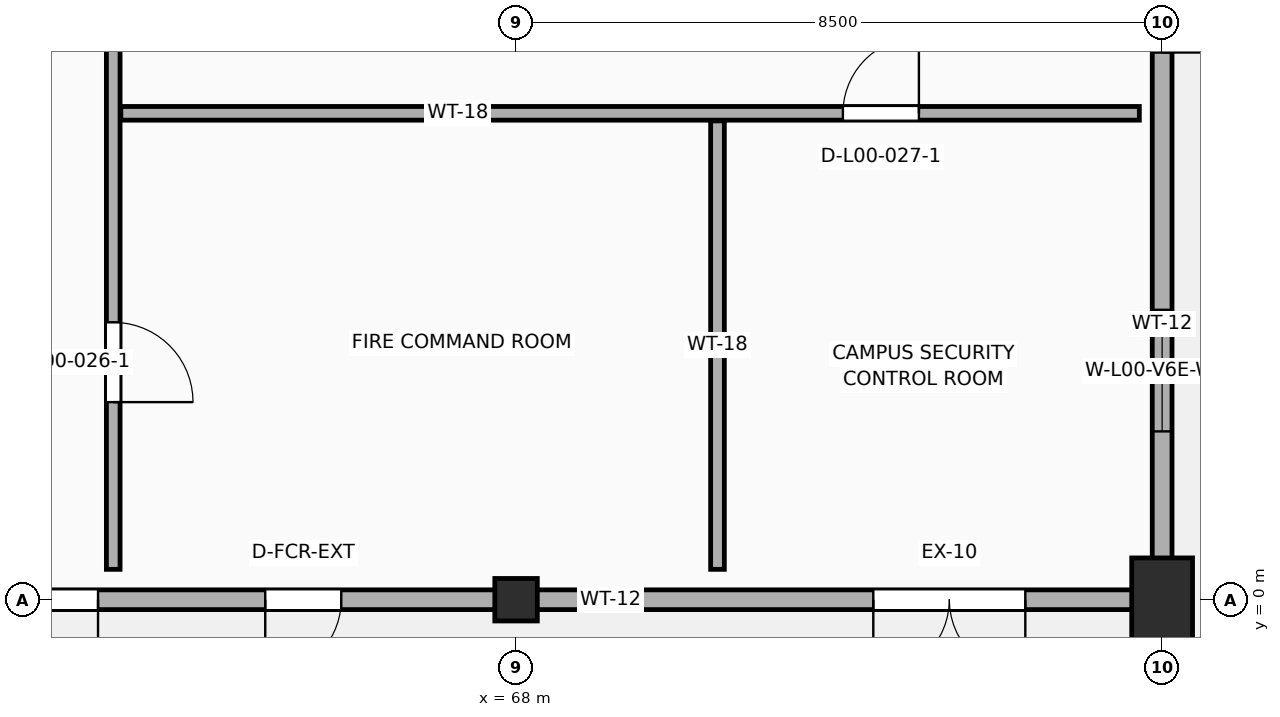
"""IFC4 building model, lengths in metres.
Left out: names, types, materials, properties, quantities, classifications, styles, units other than length and angle.
Written with IfcOpenShell. Run it as: python <this file> out.ifc"""

import sys

from ifc_helpers import new_model, si_unit, direction, frame, frame_2d, origin, origin_2d, place, context, subcontext, project, spatial, rectangle, hollow_circle, extrude, element, fill, save


model = new_model("IFC4")
c1 = context("Model", 3, precision=1e-05, world=origin(), true_north=direction((0.0, 1.0)))
c2 = subcontext(c1, "Body", "Model", "MODEL_VIEW")
j1 = project(units=[si_unit("LENGTHUNIT", "METRE"), si_unit("PLANEANGLEUNIT", "RADIAN")], contexts=[c1])
p1 = place(None, origin())
s1 = spatial("IfcSite", under=j1, at=p1, CompositionType="ELEMENT")
p2 = place(p1, origin())
s2 = spatial("IfcBuilding", under=s1, at=p2, CompositionType="ELEMENT")
p3 = place(p2, origin())
s3 = spatial("IfcBuildingStorey", under=s2, at=p3, CompositionType="ELEMENT", Elevation=0.0)
p4 = place(p3, frame((68.0, 0.0, 0.0), z_axis=(0.0, 0.0, 1.0), x_axis=(1.0, 0.0, 0.0)))
e1 = element("IfcColumn", 1, at=p4, inside=s3, PredefinedType="COLUMN", context=c2, shape_type="SweptSolid", body=[
    extrude(hollow_circle(Radius=0.28, WallThickness=0.016, at=origin_2d()), origin(), (0.0, 0.0, 1.0), 5.14),
])
p5 = place(p3, frame((76.5, 0.0, 0.0), z_axis=(0.0, 0.0, 1.0), x_axis=(1.0, 0.0, 0.0)))
e2 = element("IfcColumn", 2, at=p5, inside=s3, PredefinedType="COLUMN", context=c2, shape_type="SweptSolid", body=[
    extrude(rectangle(XDim=0.8, YDim=1.1, at=origin_2d()), origin(), (0.0, 0.0, 1.0), 5.14),
])
p6 = place(p3, frame((59.5, 0.0, 0.0), z_axis=(0.0, 0.0, 1.0), x_axis=(1.0, 0.0, 0.0)))
e3 = element("IfcWall", 3, at=p6, inside=s3, PredefinedType="STANDARD", context=c2, shape_type="SweptSolid", body=[
    extrude(rectangle(XDim=17.0, YDim=0.26, at=frame_2d((8.5, 0.0))), origin(), (0.0, 0.0, 1.0), 4.808),
])
p7 = place(p6, frame((0.8, 0.0, 0.0)))
e4 = element("IfcOpeningElement", 4, at=p7, cuts=e3, PredefinedType="OPENING", context=c2, shape_type="SweptSolid", body=[
    extrude(rectangle(XDim=2.2, YDim=2.5, at=frame_2d((1.1, 1.25))), frame((0.0, 0.142, 0.0), z_axis=(0.0, -1.0, 0.0), x_axis=(1.0, 0.0, 0.0)), (0.0, 0.0, 1.0), 0.284),
])
p8 = place(p6, frame((5.2, 0.0, 0.0)))
e5 = element("IfcOpeningElement", 5, at=p8, cuts=e3, PredefinedType="OPENING", context=c2, shape_type="SweptSolid", body=[
    extrude(rectangle(XDim=1.0, YDim=2.2, at=frame_2d((0.5, 1.1))), frame((0.0, 0.142, 0.0), z_axis=(0.0, -1.0, 0.0), x_axis=(1.0, 0.0, 0.0)), (0.0, 0.0, 1.0), 0.284),
])
p9 = place(p6, frame((13.2, 0.0, 0.0)))
e6 = element("IfcOpeningElement", 6, at=p9, cuts=e3, PredefinedType="OPENING", context=c2, shape_type="SweptSolid", body=[
    extrude(rectangle(XDim=2.0, YDim=2.4, at=frame_2d((1.0, 1.2))), frame((0.0, 0.142, 0.0), z_axis=(0.0, -1.0, 0.0), x_axis=(1.0, 0.0, 0.0)), (0.0, 0.0, 1.0), 0.284),
])
p10 = place(p3, frame((76.5, 0.0, 0.0), z_axis=(0.0, 0.0, 1.0), x_axis=(0.0, 1.0, 0.0)))
e7 = element("IfcWall", 7, at=p10, inside=s3, PredefinedType="STANDARD", context=c2, shape_type="SweptSolid", body=[
    extrude(rectangle(XDim=12.06, YDim=0.26, at=frame_2d((6.03, 0.0))), origin(), (0.0, 0.0, 1.0), 4.28),
])
p11 = place(p10, frame((7.2, 0.0, 0.0)))
e8 = element("IfcOpeningElement", 8, at=p11, cuts=e7, PredefinedType="OPENING", context=c2, shape_type="SweptSolid", body=[
    extrude(rectangle(XDim=2.2, YDim=2.5, at=frame_2d((1.1, 1.25))), frame((0.0, 0.142, 0.0), z_axis=(0.0, -1.0, 0.0), x_axis=(1.0, 0.0, 0.0)), (0.0, 0.0, 1.0), 0.284),
])
p12 = place(p10, frame((2.215, 0.0, 1.1)))
e9 = element("IfcOpeningElement", 9, at=p12, cuts=e7, PredefinedType="OPENING", context=c2, shape_type="SweptSolid", body=[
    extrude(rectangle(XDim=1.6, YDim=2.2, at=frame_2d((0.8, 1.1))), frame((0.0, 0.142, 0.0), z_axis=(0.0, -1.0, 0.0), x_axis=(1.0, 0.0, 0.0)), (0.0, 0.0, 1.0), 0.284),
])
p13 = place(p3, frame((62.7, 0.4, 0.0), z_axis=(0.0, 0.0, 1.0), x_axis=(0.0, 1.0, 0.0)))
e10 = element("IfcWall", 10, at=p13, inside=s3, PredefinedType="PARTITIONING", context=c2, shape_type="SweptSolid", body=[
    extrude(rectangle(XDim=23.4, YDim=0.18, at=frame_2d((11.7, 0.0))), origin(), (0.0, 0.0, 1.0), 4.38),
])
p14 = place(p13, frame((2.2, 0.0, 0.0)))
e11 = element("IfcOpeningElement", 11, at=p14, cuts=e10, PredefinedType="OPENING", context=c2, shape_type="SweptSolid", body=[
    extrude(rectangle(XDim=1.05, YDim=2.15, at=frame_2d((0.525, 1.075))), frame((0.0, 0.102, 0.0), z_axis=(0.0, -1.0, 0.0), x_axis=(1.0, 0.0, 0.0)), (0.0, 0.0, 1.0), 0.204),
])
p15 = place(p13, frame((14.0, 0.0, 0.0)))
e12 = element("IfcOpeningElement", 12, at=p15, cuts=e10, PredefinedType="OPENING", context=c2, shape_type="SweptSolid", body=[
    extrude(rectangle(XDim=1.35, YDim=2.25, at=frame_2d((0.675, 1.125))), frame((0.0, 0.102, 0.0), z_axis=(0.0, -1.0, 0.0), x_axis=(1.0, 0.0, 0.0)), (0.0, 0.0, 1.0), 0.204),
])
p16 = place(p3, frame((62.8, 6.4, 0.0), z_axis=(0.0, 0.0, 1.0), x_axis=(1.0, 0.0, 0.0)))
e13 = element("IfcWall", 13, at=p16, inside=s3, PredefinedType="PARTITIONING", context=c2, shape_type="SweptSolid", body=[
    extrude(rectangle(XDim=13.4, YDim=0.18, at=frame_2d((6.7, 0.0))), origin(), (0.0, 0.0, 1.0), 4.28),
])
p17 = place(p16, frame((9.5, 0.0, 0.0)))
e14 = element("IfcOpeningElement", 14, at=p17, cuts=e13, PredefinedType="OPENING", context=c2, shape_type="SweptSolid", body=[
    extrude(rectangle(XDim=1.0, YDim=2.15, at=frame_2d((0.5, 1.075))), frame((0.0, 0.102, 0.0), z_axis=(0.0, -1.0, 0.0), x_axis=(1.0, 0.0, 0.0)), (0.0, 0.0, 1.0), 0.204),
])
p18 = place(p3, frame((70.65, 0.4, 0.0), z_axis=(0.0, 0.0, 1.0), x_axis=(0.0, 1.0, 0.0)))
e15 = element("IfcWall", 15, at=p18, inside=s3, PredefinedType="PARTITIONING", context=c2, shape_type="SweptSolid", body=[
    extrude(rectangle(XDim=5.9, YDim=0.18, at=frame_2d((2.95, 0.0))), origin(), (0.0, 0.0, 1.0), 4.778),
])
p19 = place(p7, frame((2.2, 0.0, 0.0), z_axis=(0.0, 0.0, 1.0), x_axis=(-1.0, 0.0, 0.0)))
e16 = element("IfcDoor", 16, at=p19, inside=s3, OperationType="DOUBLE_DOOR_SINGLE_SWING", PredefinedType="DOOR", context=c2, shape_type="SweptSolid", body=[
    extrude(rectangle(XDim=2.2, YDim=2.5, at=frame_2d((1.1, 1.25))), frame((0.0, 0.025, 0.0), z_axis=(0.0, -1.0, 0.0), x_axis=(1.0, 0.0, 0.0)), (0.0, 0.0, 1.0), 0.05),
])
fill(e4, e16)
p20 = place(p8, frame((1.0, 0.0, 0.0), z_axis=(0.0, 0.0, 1.0), x_axis=(-1.0, 0.0, 0.0)))
e17 = element("IfcDoor", 17, at=p20, inside=s3, OperationType="SINGLE_SWING_LEFT", PredefinedType="DOOR", context=c2, shape_type="SweptSolid", body=[
    extrude(rectangle(XDim=1.0, YDim=2.2, at=frame_2d((0.5, 1.1))), frame((0.0, 0.025, 0.0), z_axis=(0.0, -1.0, 0.0), x_axis=(1.0, 0.0, 0.0)), (0.0, 0.0, 1.0), 0.05),
])
fill(e5, e17)
p21 = place(p9, frame((2.0, 0.0, 0.0), z_axis=(0.0, 0.0, 1.0), x_axis=(-1.0, 0.0, 0.0)))
e18 = element("IfcDoor", 18, at=p21, inside=s3, OperationType="DOUBLE_DOOR_SINGLE_SWING", PredefinedType="DOOR", context=c2, shape_type="SweptSolid", body=[
    extrude(rectangle(XDim=2.0, YDim=2.4, at=frame_2d((1.0, 1.2))), frame((0.0, 0.025, 0.0), z_axis=(0.0, -1.0, 0.0), x_axis=(1.0, 0.0, 0.0)), (0.0, 0.0, 1.0), 0.05),
])
fill(e6, e18)
p22 = place(p11, frame((2.2, 0.0, 0.0), z_axis=(0.0, 0.0, 1.0), x_axis=(-1.0, 0.0, 0.0)))
e19 = element("IfcDoor", 19, at=p22, inside=s3, OperationType="DOUBLE_DOOR_SINGLE_SWING", PredefinedType="DOOR", context=c2, shape_type="SweptSolid", body=[
    extrude(rectangle(XDim=2.2, YDim=2.5, at=frame_2d((1.1, 1.25))), frame((0.0, 0.025, 0.0), z_axis=(0.0, -1.0, 0.0), x_axis=(1.0, 0.0, 0.0)), (0.0, 0.0, 1.0), 0.05),
])
fill(e8, e19)
p23 = place(p12, origin())
e20 = element("IfcWindow", 20, at=p23, inside=s3, PartitioningType="SINGLE_PANEL", PredefinedType="WINDOW", context=c2, shape_type="SweptSolid", body=[
    extrude(rectangle(XDim=1.6, YDim=2.2, at=frame_2d((0.8, 1.1))), frame((0.0, 0.03, 0.0), z_axis=(0.0, -1.0, 0.0), x_axis=(1.0, 0.0, 0.0)), (0.0, 0.0, 1.0), 0.06),
])
fill(e9, e20)
p24 = place(p14, frame((1.05, 0.0, 0.0), z_axis=(0.0, 0.0, 1.0), x_axis=(-1.0, 0.0, 0.0)))
e21 = element("IfcDoor", 21, at=p24, inside=s3, OperationType="SINGLE_SWING_LEFT", PredefinedType="DOOR", context=c2, shape_type="SweptSolid", body=[
    extrude(rectangle(XDim=1.05, YDim=2.15, at=frame_2d((0.525, 1.075))), frame((0.0, 0.025, 0.0), z_axis=(0.0, -1.0, 0.0), x_axis=(1.0, 0.0, 0.0)), (0.0, 0.0, 1.0), 0.05),
])
fill(e11, e21)
p25 = place(p17, origin())
e22 = element("IfcDoor", 22, at=p25, inside=s3, OperationType="SINGLE_SWING_RIGHT", PredefinedType="DOOR", context=c2, shape_type="SweptSolid", body=[
    extrude(rectangle(XDim=1.0, YDim=2.15, at=frame_2d((0.5, 1.075))), frame((0.0, 0.025, 0.0), z_axis=(0.0, -1.0, 0.0), x_axis=(1.0, 0.0, 0.0)), (0.0, 0.0, 1.0), 0.05),
])
fill(e14, e22)
save(model, sys.argv[1])
